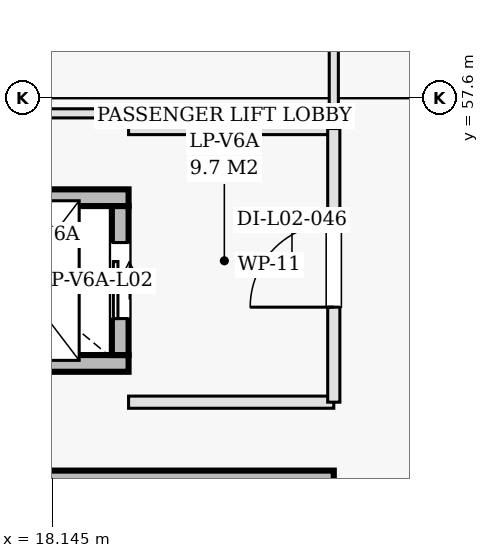
"""IFC4 building model, lengths in metres.
Left out: names, types, materials, properties, quantities, classifications, styles, units other than length and angle.
Written with IfcOpenShell. Run it as: python <this file> out.ifc"""

import sys

from ifc_helpers import new_model, si_unit, direction, frame, frame_2d, origin, place, context, subcontext, project, spatial, rectangle, extrude, element, fill, save


model = new_model("IFC4")
c1 = context("Model", 3, precision=1e-05, world=origin(), true_north=direction((0.0, 1.0)))
c2 = subcontext(c1, "Body", "Model", "MODEL_VIEW")
j1 = project(units=[si_unit("LENGTHUNIT", "METRE"), si_unit("PLANEANGLEUNIT", "RADIAN")], contexts=[c1])
p1 = place(None, origin())
s1 = spatial("IfcSite", under=j1, at=p1, CompositionType="ELEMENT")
p2 = place(p1, origin())
s2 = spatial("IfcBuilding", under=s1, at=p2, CompositionType="ELEMENT")
p3 = place(p2, frame((0.0, 0.0, 9.6)))
s3 = spatial("IfcBuildingStorey", under=s2, at=p3, CompositionType="ELEMENT", Elevation=9.6)
p4 = place(p3, frame((17.15, 52.55, 0.0), z_axis=(0.0, 0.0, 1.0), x_axis=(1.0, 0.0, 0.0)))
e1 = element("IfcWall", 1, at=p4, inside=s3, PredefinedType="SHEAR", context=c2, shape_type="SweptSolid", body=[
    extrude(rectangle(XDim=4.7, YDim=0.3, at=frame_2d((2.35, 0.0))), origin(), (0.0, 0.0, 1.0), 3.94),
])
for number, where, z_axis, x_axis in (
    (2, (16.25, 54.11, 0.0), (0.0, 0.0, 1.0), (1.0, 0.0, 0.0)),
    (3, (16.25, 56.29, 0.0), (0.0, 0.0, 1.0), (1.0, 0.0, 0.0)),
):
    element("IfcWall", number, at=place(p3, frame(where, z_axis=z_axis, x_axis=x_axis)), inside=s3, PredefinedType="SHEAR", context=c2, shape_type="SweptSolid", body=[
        extrude(rectangle(XDim=2.9, YDim=0.22, at=frame_2d((1.45, 0.0))), origin(), (0.0, 0.0, 1.0), 3.94),
    ])
p5 = place(p3, frame((19.04, 54.22, 0.0), z_axis=(0.0, 0.0, 1.0), x_axis=(0.0, 1.0, 0.0)))
e4 = element("IfcWall", 4, at=p5, inside=s3, PredefinedType="SHEAR", context=c2, shape_type="SweptSolid", body=[
    extrude(rectangle(XDim=1.96, YDim=0.22, at=frame_2d((0.98, 0.0))), origin(), (0.0, 0.0, 1.0), 3.94),
])
p6 = place(p5, frame((0.48, 0.0, 0.0)))
e5 = element("IfcOpeningElement", 5, at=p6, cuts=e4, PredefinedType="OPENING", context=c2, shape_type="SweptSolid", body=[
    extrude(rectangle(XDim=1.0, YDim=2.15, at=frame_2d((0.5, 1.075))), frame((0.0, 0.12, 0.0), z_axis=(0.0, -1.0, 0.0), x_axis=(1.0, 0.0, 0.0)), (0.0, 0.0, 1.0), 0.24),
])
for number, where, z_axis, x_axis in (
    (6, (19.15, 53.6, 0.0), (0.0, 0.0, 1.0), (1.0, 0.0, 0.0)),
    (7, (19.15, 57.2, 0.0), (0.0, 0.0, 1.0), (1.0, 0.0, 0.0)),
):
    element("IfcWall", number, at=place(p3, frame(where, z_axis=z_axis, x_axis=x_axis)), inside=s3, PredefinedType="PARTITIONING", context=c2, shape_type="SweptSolid", body=[
        extrude(rectangle(XDim=2.7, YDim=0.16, at=frame_2d((1.35, 0.0))), origin(), (0.0, 0.0, 1.0), 3.94),
    ])
p7 = place(p3, frame((21.85, 53.6, 0.0), z_axis=(0.0, 0.0, 1.0), x_axis=(0.0, 1.0, 0.0)))
e8 = element("IfcWall", 8, at=p7, inside=s3, PredefinedType="PARTITIONING", context=c2, shape_type="SweptSolid", body=[
    extrude(rectangle(XDim=3.6, YDim=0.16, at=frame_2d((1.8, 0.0))), origin(), (0.0, 0.0, 1.0), 3.94),
])
p8 = place(p7, frame((1.25, 0.0, 0.0)))
e9 = element("IfcOpeningElement", 9, at=p8, cuts=e8, PredefinedType="OPENING", context=c2, shape_type="SweptSolid", body=[
    extrude(rectangle(XDim=1.1, YDim=2.15, at=frame_2d((0.55, 1.075))), frame((0.0, 0.09, 0.0), z_axis=(0.0, -1.0, 0.0), x_axis=(1.0, 0.0, 0.0)), (0.0, 0.0, 1.0), 0.18),
])
p9 = place(p3, frame((21.85, 57.44, 0.0), z_axis=(0.0, 0.0, 1.0), x_axis=(0.0, 1.0, 0.0)))
e10 = element("IfcWall", 10, at=p9, inside=s3, PredefinedType="PARTITIONING", context=c2, shape_type="SweptSolid", body=[
    extrude(rectangle(XDim=3.34, YDim=0.12, at=frame_2d((1.67, 0.0))), origin(), (0.0, 0.0, 1.0), 3.225),
])
p10 = place(p9, frame((1.12, 0.0, 0.0)))
e11 = element("IfcOpeningElement", 11, at=p10, cuts=e10, PredefinedType="OPENING", context=c2, shape_type="SweptSolid", body=[
    extrude(rectangle(XDim=1.1, YDim=2.15, at=frame_2d((0.55, 1.075))), frame((0.0, 0.07, 0.0), z_axis=(0.0, -1.0, 0.0), x_axis=(1.0, 0.0, 0.0)), (0.0, 0.0, 1.0), 0.14),
])
p11 = place(p3, frame((17.15, 57.4, 0.0), z_axis=(0.0, 0.0, 1.0), x_axis=(1.0, 0.0, 0.0)))
e12 = element("IfcWall", 12, at=p11, inside=s3, PredefinedType="PARTITIONING", context=c2, shape_type="SweptSolid", body=[
    extrude(rectangle(XDim=1.867, YDim=0.12, at=frame_2d((0.934, 0.0))), origin(), (0.0, 0.0, 1.0), 3.225),
])
p12 = place(p6, origin())
e13 = element("IfcDoor", 13, at=p12, inside=s3, OperationType="SLIDING_TO_LEFT", PredefinedType="DOOR", context=c2, shape_type="SweptSolid", body=[
    extrude(rectangle(XDim=1.0, YDim=2.15, at=frame_2d((0.5, 1.075))), frame((0.0, 0.025, 0.0), z_axis=(0.0, -1.0, 0.0), x_axis=(1.0, 0.0, 0.0)), (0.0, 0.0, 1.0), 0.05),
])
fill(e5, e13)
p13 = place(p8, origin())
e14 = element("IfcDoor", 14, at=p13, inside=s3, OperationType="SINGLE_SWING_LEFT", PredefinedType="DOOR", context=c2, shape_type="SweptSolid", body=[
    extrude(rectangle(XDim=1.1, YDim=2.15, at=frame_2d((0.55, 1.075))), frame((0.0, 0.025, 0.0), z_axis=(0.0, -1.0, 0.0), x_axis=(1.0, 0.0, 0.0)), (0.0, 0.0, 1.0), 0.05),
])
fill(e9, e14)
save(model, sys.argv[1])
